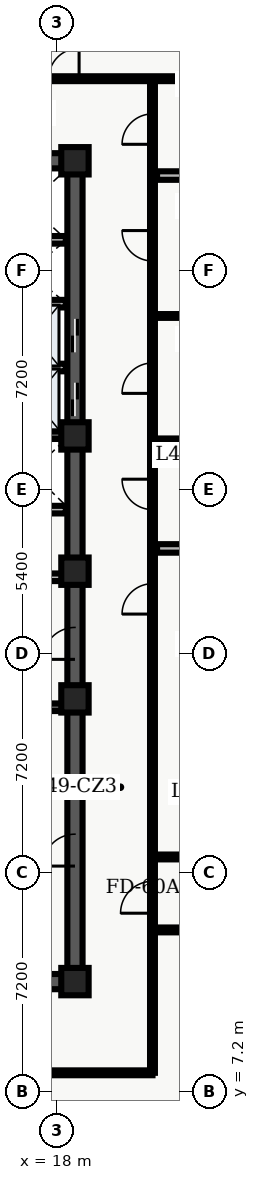
"""IFC4 building model, lengths in metres.
Left out: names, types, materials, properties, quantities, classifications, styles, units other than length and angle.
Written with IfcOpenShell. Run it as: python <this file> out.ifc"""

import sys

from ifc_helpers import new_model, entity, si_unit, converted_unit, direction, frame, origin_with_axes, origin_2d_with_axis, place, context, subcontext, project, spatial, polyline, rectangle, outline, extrude, element, fill, save


model = new_model("IFC4")
c1 = context("Model", 3, precision=1e-05, world=origin_with_axes(), true_north=direction((0.0, 1.0)))
c2 = subcontext(c1, "Body", "Model", "MODEL_VIEW")
j1 = project(units=[si_unit("LENGTHUNIT", "METRE"), converted_unit("PLANEANGLEUNIT", "DEGREE", entity("IfcPlaneAngleMeasure", 0.017), si_unit("PLANEANGLEUNIT", "RADIAN"), dimensions=[0, 0, 0, 0, 0, 0, 0])], contexts=[c1])
p1 = place(None, origin_with_axes())
s1 = spatial("IfcSite", under=j1, at=p1, CompositionType="ELEMENT")
p2 = place(p1, origin_with_axes())
s2 = spatial("IfcBuilding", under=s1, at=p2, CompositionType="ELEMENT")
p3 = place(p2, frame((0.0, 0.0, 200.4), z_axis=(0.0, 0.0, 1.0), x_axis=(1.0, 0.0, 0.0)))
s3 = spatial("IfcBuildingStorey", under=s2, at=p3, CompositionType="ELEMENT", Elevation=200.4)
p4 = place(p3, frame((11.4, 10.8, 0.0), z_axis=(0.0, 0.0, 1.0), x_axis=(1.0, 0.0, 0.0)))
e1 = element("IfcWall", 1, at=p4, inside=s3, PredefinedType="SHEAR", context=c2, shape_type="SweptSolid", body=[
    extrude(outline(polyline([(0.0, -0.25), (7.2, -0.25), (7.2, 0.25), (0.0, 0.25), (0.0, -0.25)])), origin_with_axes(), (0.0, 0.0, 1.0), 3.66),
])
p5 = place(p4, frame((2.625, 0.0, 0.0), z_axis=(0.0, 0.0, 1.0), x_axis=(1.0, 0.0, 0.0)))
e2 = element("IfcOpeningElement", 2, at=p5, cuts=e1, PredefinedType="OPENING", context=c2, shape_type="SweptSolid", body=[
    extrude(rectangle(XDim=1.05, YDim=0.52, at=origin_2d_with_axis()), origin_with_axes(), (0.0, 0.0, 1.0), 2.15),
])
p6 = place(p3, frame((11.4, 37.8, 0.0), z_axis=(0.0, 0.0, 1.0), x_axis=(1.0, 0.0, 0.0)))
e3 = element("IfcWall", 3, at=p6, inside=s3, PredefinedType="SHEAR", context=c2, shape_type="SweptSolid", body=[
    extrude(outline(polyline([(0.0, -0.25), (7.2, -0.25), (7.2, 0.25), (0.0, 0.25), (0.0, -0.25)])), origin_with_axes(), (0.0, 0.0, 1.0), 3.66),
])
p7 = place(p6, frame((2.625, 0.0, 0.0), z_axis=(0.0, 0.0, 1.0), x_axis=(1.0, 0.0, 0.0)))
e4 = element("IfcOpeningElement", 4, at=p7, cuts=e3, PredefinedType="OPENING", context=c2, shape_type="SweptSolid", body=[
    extrude(rectangle(XDim=1.05, YDim=0.52, at=origin_2d_with_axis()), origin_with_axes(), (0.0, 0.0, 1.0), 2.15),
])
p8 = place(p3, frame((18.6, 10.8, 0.0), z_axis=(0.0, 0.0, 1.0), x_axis=(0.0, 1.0, 0.0)))
e5 = element("IfcWall", 5, at=p8, inside=s3, PredefinedType="SHEAR", context=c2, shape_type="SweptSolid", body=[
    extrude(outline(polyline([(0.0, -0.25), (13.5, -0.25), (13.5, 0.25), (0.0, 0.25), (0.0, -0.25)])), origin_with_axes(), (0.0, 0.0, 1.0), 3.66),
])
p9 = place(p8, frame((11.125, 0.0, 0.0), z_axis=(0.0, 0.0, 1.0), x_axis=(1.0, 0.0, 0.0)))
e6 = element("IfcOpeningElement", 6, at=p9, cuts=e5, PredefinedType="OPENING", context=c2, shape_type="SweptSolid", body=[
    extrude(rectangle(XDim=1.05, YDim=0.52, at=origin_2d_with_axis()), origin_with_axes(), (0.0, 0.0, 1.0), 2.15),
])
p10 = place(p8, frame((4.325, 0.0, 0.0), z_axis=(0.0, 0.0, 1.0), x_axis=(1.0, 0.0, 0.0)))
e7 = element("IfcOpeningElement", 7, at=p10, cuts=e5, PredefinedType="OPENING", context=c2, shape_type="SweptSolid", body=[
    extrude(rectangle(XDim=1.05, YDim=0.52, at=origin_2d_with_axis()), origin_with_axes(), (0.0, 0.0, 1.0), 2.15),
])
p11 = place(p3, frame((18.6, 24.3, 0.0), z_axis=(0.0, 0.0, 1.0), x_axis=(0.0, 1.0, 0.0)))
e8 = element("IfcWall", 8, at=p11, inside=s3, PredefinedType="SHEAR", context=c2, shape_type="SweptSolid", body=[
    extrude(outline(polyline([(0.0, -0.25), (13.5, -0.25), (13.5, 0.25), (0.0, 0.25), (0.0, -0.25)])), origin_with_axes(), (0.0, 0.0, 1.0), 3.66),
])
p12 = place(p11, frame((5.65, 0.0, 0.0), z_axis=(0.0, 0.0, 1.0), x_axis=(1.0, 0.0, 0.0)))
e9 = element("IfcOpeningElement", 9, at=p12, cuts=e8, PredefinedType="OPENING", context=c2, shape_type="SweptSolid", body=[
    extrude(rectangle(XDim=1.1, YDim=0.52, at=origin_2d_with_axis()), origin_with_axes(), (0.0, 0.0, 1.0), 2.15),
])
p13 = place(p11, frame((7.75, 0.0, 0.0), z_axis=(0.0, 0.0, 1.0), x_axis=(1.0, 0.0, 0.0)))
e10 = element("IfcOpeningElement", 10, at=p13, cuts=e8, PredefinedType="OPENING", context=c2, shape_type="SweptSolid", body=[
    extrude(rectangle(XDim=1.1, YDim=0.52, at=origin_2d_with_axis()), origin_with_axes(), (0.0, 0.0, 1.0), 2.15),
])
for number, where, z_axis, x_axis in (
    (11, (11.65, 19.825, 0.0), (0.0, 0.0, 1.0), (1.0, 0.0, 0.0)),
    (12, (11.65, 28.775, 0.0), (0.0, 0.0, 1.0), (1.0, 0.0, 0.0)),
):
    element("IfcWall", number, at=place(p3, frame(where, z_axis=z_axis, x_axis=x_axis)), inside=s3, PredefinedType="SHEAR", context=c2, shape_type="SweptSolid", body=[
        extrude(outline(polyline([(0.0, -0.125), (6.7, -0.125), (6.7, 0.125), (0.0, 0.125), (0.0, -0.125)])), origin_with_axes(), (0.0, 0.0, 1.0), 3.66),
    ])
p14 = place(p3, frame((11.7, 24.1, 0.0), z_axis=(0.0, 0.0, 1.0), x_axis=(1.0, 0.0, 0.0)))
e13 = element("IfcWall", 13, at=p14, inside=s3, PredefinedType="SOLIDWALL", context=c2, shape_type="SweptSolid", body=[
    extrude(outline(polyline([(0.0, -0.125), (6.6, -0.125), (6.6, 0.125), (0.0, 0.125), (0.0, -0.125)])), origin_with_axes(), (0.0, 0.0, 1.0), 2.7),
])
p15 = place(p14, frame((3.75, 0.0, 0.0), z_axis=(0.0, 0.0, 1.0), x_axis=(1.0, 0.0, 0.0)))
e14 = element("IfcOpeningElement", 14, at=p15, cuts=e13, PredefinedType="OPENING", context=c2, shape_type="SweptSolid", body=[
    extrude(rectangle(XDim=0.9, YDim=0.27, at=origin_2d_with_axis()), origin_with_axes(), (0.0, 0.0, 1.0), 2.15),
])
p16 = place(p3, frame((11.7, 26.325, 0.0), z_axis=(0.0, 0.0, 1.0), x_axis=(1.0, 0.0, 0.0)))
e15 = element("IfcWall", 15, at=p16, inside=s3, PredefinedType="SOLIDWALL", context=c2, shape_type="SweptSolid", body=[
    extrude(outline(polyline([(0.0, -0.125), (6.6, -0.125), (6.6, 0.125), (0.0, 0.125), (0.0, -0.125)])), origin_with_axes(), (0.0, 0.0, 1.0), 2.7),
])
p17 = place(p16, frame((3.5, 0.0, 0.0), z_axis=(0.0, 0.0, 1.0), x_axis=(1.0, 0.0, 0.0)))
e16 = element("IfcOpeningElement", 16, at=p17, cuts=e15, PredefinedType="OPENING", context=c2, shape_type="SweptSolid", body=[
    extrude(rectangle(XDim=0.9, YDim=0.27, at=origin_2d_with_axis()), origin_with_axes(), (0.0, 0.0, 1.0), 2.15),
])
for number, where, z_axis, x_axis in (
    (17, (18.6, 10.8, 0.0), (0.0, 0.0, 1.0), (1.0, 0.0, 0.0)),
    (18, (18.6, 20.1, 0.0), (0.0, 0.0, 1.0), (1.0, 0.0, 0.0)),
    (19, (18.6, 24.3, 0.0), (0.0, 0.0, 1.0), (1.0, 0.0, 0.0)),
    (20, (18.6, 28.75, 0.0), (0.0, 0.0, 1.0), (1.0, 0.0, 0.0)),
    (21, (18.6, 37.8, 0.0), (0.0, 0.0, 1.0), (1.0, 0.0, 0.0)),
):
    element("IfcColumn", number, at=place(p3, frame(where, z_axis=z_axis, x_axis=x_axis)), inside=s3, PredefinedType="COLUMN", context=c2, shape_type="SweptSolid", body=[
        extrude(rectangle(XDim=0.9, YDim=0.9, at=origin_2d_with_axis()), origin_with_axes(), (0.0, 0.0, 1.0), 3.9),
    ])
for number, where, z_axis, x_axis in (
    (22, (15.84, 31.0, 0.0), (0.0, 0.0, 1.0), (1.0, 0.0, 0.0)),
    (23, (15.84, 33.1, 0.0), (0.0, 0.0, 1.0), (1.0, 0.0, 0.0)),
    (24, (15.84, 35.2, 0.0), (0.0, 0.0, 1.0), (1.0, 0.0, 0.0)),
):
    element("IfcWall", number, at=place(p3, frame(where, z_axis=z_axis, x_axis=x_axis)), inside=s3, PredefinedType="SOLIDWALL", context=c2, shape_type="SweptSolid", body=[
        extrude(outline(polyline([(0.0, -0.125), (2.46, -0.125), (2.46, 0.125), (0.0, 0.125), (0.0, -0.125)])), origin_with_axes(), (0.0, 0.0, 1.0), 2.7),
    ])
p18 = place(p3, frame((2.6, 7.8, 0.0), z_axis=(0.0, 0.0, 1.0), x_axis=(1.0, 0.0, 0.0)))
e25 = element("IfcWall", 25, at=p18, inside=s3, PredefinedType="PARTITIONING", context=c2, shape_type="SweptSolid", body=[
    extrude(outline(polyline([(0.0, -0.08), (18.55, -0.08), (18.55, 0.08), (0.0, 0.08), (0.0, -0.08)])), origin_with_axes(), (0.0, 0.0, 1.0), 2.7),
])
p19 = place(p18, frame((5.04, 0.0, 0.0), z_axis=(0.0, 0.0, 1.0), x_axis=(1.0, 0.0, 0.0)))
e26 = element("IfcOpeningElement", 26, at=p19, cuts=e25, PredefinedType="OPENING", context=c2, shape_type="SweptSolid", body=[
    extrude(rectangle(XDim=1.2, YDim=0.18, at=origin_2d_with_axis()), origin_with_axes(), (0.0, 0.0, 1.0), 2.2),
])
p20 = place(p18, frame((13.415, 0.0, 0.0), z_axis=(0.0, 0.0, 1.0), x_axis=(1.0, 0.0, 0.0)))
e27 = element("IfcOpeningElement", 27, at=p20, cuts=e25, PredefinedType="OPENING", context=c2, shape_type="SweptSolid", body=[
    extrude(rectangle(XDim=1.0, YDim=0.18, at=origin_2d_with_axis()), origin_with_axes(), (0.0, 0.0, 1.0), 2.15),
])
p21 = place(p3, frame((2.6, 40.5, 0.0), z_axis=(0.0, 0.0, 1.0), x_axis=(1.0, 0.0, 0.0)))
e28 = element("IfcWall", 28, at=p21, inside=s3, PredefinedType="PARTITIONING", context=c2, shape_type="SweptSolid", body=[
    extrude(outline(polyline([(0.0, -0.08), (26.177, -0.08), (26.177, 0.08), (0.0, 0.08), (0.0, -0.08)])), origin_with_axes(), (0.0, 0.0, 1.0), 2.7),
])
p22 = place(p21, frame((1.554, 0.0, 0.0), z_axis=(0.0, 0.0, 1.0), x_axis=(1.0, 0.0, 0.0)))
e29 = element("IfcOpeningElement", 29, at=p22, cuts=e28, PredefinedType="OPENING", context=c2, shape_type="SweptSolid", body=[
    extrude(rectangle(XDim=1.0, YDim=0.18, at=origin_2d_with_axis()), origin_with_axes(), (0.0, 0.0, 1.0), 2.15),
])
p23 = place(p21, frame((6.84, 0.0, 0.0), z_axis=(0.0, 0.0, 1.0), x_axis=(1.0, 0.0, 0.0)))
e30 = element("IfcOpeningElement", 30, at=p23, cuts=e28, PredefinedType="OPENING", context=c2, shape_type="SweptSolid", body=[
    extrude(rectangle(XDim=1.0, YDim=0.18, at=origin_2d_with_axis()), origin_with_axes(), (0.0, 0.0, 1.0), 2.15),
])
p24 = place(p21, frame((10.996, 0.0, 0.0), z_axis=(0.0, 0.0, 1.0), x_axis=(1.0, 0.0, 0.0)))
e31 = element("IfcOpeningElement", 31, at=p24, cuts=e28, PredefinedType="OPENING", context=c2, shape_type="SweptSolid", body=[
    extrude(rectangle(XDim=1.0, YDim=0.18, at=origin_2d_with_axis()), origin_with_axes(), (0.0, 0.0, 1.0), 2.15),
])
p25 = place(p21, frame((15.636, 0.0, 0.0), z_axis=(0.0, 0.0, 1.0), x_axis=(1.0, 0.0, 0.0)))
e32 = element("IfcOpeningElement", 32, at=p25, cuts=e28, PredefinedType="OPENING", context=c2, shape_type="SweptSolid", body=[
    extrude(rectangle(XDim=1.0, YDim=0.18, at=origin_2d_with_axis()), origin_with_axes(), (0.0, 0.0, 1.0), 2.15),
])
p26 = place(p3, frame((21.15, 7.8, 0.0), z_axis=(0.0, 0.0, 1.0), x_axis=(0.0, 1.0, 0.0)))
e33 = element("IfcWall", 33, at=p26, inside=s3, PredefinedType="PARTITIONING", context=c2, shape_type="SweptSolid", body=[
    extrude(outline(polyline([(0.0, -0.08), (32.7, -0.08), (32.7, 0.08), (0.0, 0.08), (0.0, -0.08)])), origin_with_axes(), (0.0, 0.0, 1.0), 2.7),
])
p27 = place(p26, frame((15.589, 0.0, 0.0), z_axis=(0.0, 0.0, 1.0), x_axis=(1.0, 0.0, 0.0)))
e34 = element("IfcOpeningElement", 34, at=p27, cuts=e33, PredefinedType="OPENING", context=c2, shape_type="SweptSolid", body=[
    extrude(rectangle(XDim=1.0, YDim=0.18, at=origin_2d_with_axis()), origin_with_axes(), (0.0, 0.0, 1.0), 2.15),
])
p28 = place(p26, frame((19.026, 0.0, 0.0), z_axis=(0.0, 0.0, 1.0), x_axis=(1.0, 0.0, 0.0)))
e35 = element("IfcOpeningElement", 35, at=p28, cuts=e33, PredefinedType="OPENING", context=c2, shape_type="SweptSolid", body=[
    extrude(rectangle(XDim=1.0, YDim=0.18, at=origin_2d_with_axis()), origin_with_axes(), (0.0, 0.0, 1.0), 2.15),
])
p29 = place(p26, frame((22.849, 0.0, 0.0), z_axis=(0.0, 0.0, 1.0), x_axis=(1.0, 0.0, 0.0)))
e36 = element("IfcOpeningElement", 36, at=p29, cuts=e33, PredefinedType="OPENING", context=c2, shape_type="SweptSolid", body=[
    extrude(rectangle(XDim=1.0, YDim=0.18, at=origin_2d_with_axis()), origin_with_axes(), (0.0, 0.0, 1.0), 2.15),
])
p30 = place(p26, frame((27.204, 0.0, 0.0), z_axis=(0.0, 0.0, 1.0), x_axis=(1.0, 0.0, 0.0)))
e37 = element("IfcOpeningElement", 37, at=p30, cuts=e33, PredefinedType="OPENING", context=c2, shape_type="SweptSolid", body=[
    extrude(rectangle(XDim=1.0, YDim=0.18, at=origin_2d_with_axis()), origin_with_axes(), (0.0, 0.0, 1.0), 2.15),
])
p31 = place(p26, frame((31.042, 0.0, 0.0), z_axis=(0.0, 0.0, 1.0), x_axis=(1.0, 0.0, 0.0)))
e38 = element("IfcOpeningElement", 38, at=p31, cuts=e33, PredefinedType="OPENING", context=c2, shape_type="SweptSolid", body=[
    extrude(rectangle(XDim=1.0, YDim=0.18, at=origin_2d_with_axis()), origin_with_axes(), (0.0, 0.0, 1.0), 2.15),
])
p32 = place(p26, frame((5.775, 0.0, 0.0), z_axis=(0.0, 0.0, 1.0), x_axis=(1.0, 0.0, 0.0)))
e39 = element("IfcOpeningElement", 39, at=p32, cuts=e33, PredefinedType="OPENING", context=c2, shape_type="SweptSolid", body=[
    extrude(rectangle(XDim=1.05, YDim=0.18, at=origin_2d_with_axis()), origin_with_axes(), (0.0, 0.0, 1.0), 2.15),
])
p33 = place(p3, frame((21.3, 25.049, 0.0), z_axis=(0.0, 0.0, 1.0), x_axis=(1.0, 0.0, 0.0)))
e40 = element("IfcWall", 40, at=p33, inside=s3, PredefinedType="PARTITIONING", context=c2, shape_type="SweptSolid", body=[
    extrude(outline(polyline([(0.0, -0.14), (7.477, -0.14), (7.477, 0.14), (0.0, 0.14), (0.0, -0.14)])), origin_with_axes(), (0.0, 0.0, 1.0), 2.7),
])
for number, where, z_axis, x_axis in (
    (41, (21.3, 28.603, 0.0), (0.0, 0.0, 1.0), (1.0, 0.0, 0.0)),
    (42, (21.3, 32.695, 0.0), (0.0, 0.0, 1.0), (1.0, 0.0, 0.0)),
):
    element("IfcWall", number, at=place(p3, frame(where, z_axis=z_axis, x_axis=x_axis)), inside=s3, PredefinedType="PARTITIONING", context=c2, shape_type="SweptSolid", body=[
        extrude(outline(polyline([(0.0, -0.062), (7.477, -0.062), (7.477, 0.062), (0.0, 0.062), (0.0, -0.062)])), origin_with_axes(), (0.0, 0.0, 1.0), 2.7),
    ])
p34 = place(p3, frame((21.3, 37.314, 0.0), z_axis=(0.0, 0.0, 1.0), x_axis=(1.0, 0.0, 0.0)))
e43 = element("IfcWall", 43, at=p34, inside=s3, PredefinedType="PARTITIONING", context=c2, shape_type="SweptSolid", body=[
    extrude(outline(polyline([(0.0, -0.14), (7.477, -0.14), (7.477, 0.14), (0.0, 0.14), (0.0, -0.14)])), origin_with_axes(), (0.0, 0.0, 1.0), 2.7),
])
p35 = place(p3, frame((21.15, 12.5, 0.0), z_axis=(0.0, 0.0, 1.0), x_axis=(1.0, 0.0, 0.0)))
e44 = element("IfcWall", 44, at=p35, inside=s3, PredefinedType="PARTITIONING", context=c2, shape_type="SweptSolid", body=[
    extrude(outline(polyline([(0.0, -0.08), (15.2, -0.08), (15.2, 0.08), (0.0, 0.08), (0.0, -0.08)])), origin_with_axes(), (0.0, 0.0, 1.0), 2.7),
])
p36 = place(p35, frame((1.758, 0.0, 0.0), z_axis=(0.0, 0.0, 1.0), x_axis=(1.0, 0.0, 0.0)))
e45 = element("IfcOpeningElement", 45, at=p36, cuts=e44, PredefinedType="OPENING", context=c2, shape_type="SweptSolid", body=[
    extrude(rectangle(XDim=1.0, YDim=0.18, at=origin_2d_with_axis()), origin_with_axes(), (0.0, 0.0, 1.0), 2.15),
])
p37 = place(p35, frame((4.893, 0.0, 0.0), z_axis=(0.0, 0.0, 1.0), x_axis=(1.0, 0.0, 0.0)))
e46 = element("IfcOpeningElement", 46, at=p37, cuts=e44, PredefinedType="OPENING", context=c2, shape_type="SweptSolid", body=[
    extrude(rectangle(XDim=1.0, YDim=0.18, at=origin_2d_with_axis()), origin_with_axes(), (0.0, 0.0, 1.0), 2.15),
])
p38 = place(p35, frame((8.555, 0.0, 0.0), z_axis=(0.0, 0.0, 1.0), x_axis=(1.0, 0.0, 0.0)))
e47 = element("IfcOpeningElement", 47, at=p38, cuts=e44, PredefinedType="OPENING", context=c2, shape_type="SweptSolid", body=[
    extrude(rectangle(XDim=1.0, YDim=0.18, at=origin_2d_with_axis()), origin_with_axes(), (0.0, 0.0, 1.0), 2.15),
])
p39 = place(p35, frame((12.889, 0.0, 0.0), z_axis=(0.0, 0.0, 1.0), x_axis=(1.0, 0.0, 0.0)))
e48 = element("IfcOpeningElement", 48, at=p39, cuts=e44, PredefinedType="OPENING", context=c2, shape_type="SweptSolid", body=[
    extrude(rectangle(XDim=1.0, YDim=0.18, at=origin_2d_with_axis()), origin_with_axes(), (0.0, 0.0, 1.0), 2.15),
])
p40 = place(p3, frame((21.15, 14.9, 0.0), z_axis=(0.0, 0.0, 1.0), x_axis=(1.0, 0.0, 0.0)))
e49 = element("IfcWall", 49, at=p40, inside=s3, PredefinedType="PARTITIONING", context=c2, shape_type="SweptSolid", body=[
    extrude(outline(polyline([(0.0, -0.08), (15.2, -0.08), (15.2, 0.08), (0.0, 0.08), (0.0, -0.08)])), origin_with_axes(), (0.0, 0.0, 1.0), 2.7),
])
p41 = place(p40, frame((7.65, 0.0, 0.0), z_axis=(0.0, 0.0, 1.0), x_axis=(1.0, 0.0, 0.0)))
e50 = element("IfcOpeningElement", 50, at=p41, cuts=e49, PredefinedType="OPENING", context=c2, shape_type="SweptSolid", body=[
    extrude(rectangle(XDim=1.0, YDim=0.18, at=origin_2d_with_axis()), origin_with_axes(), (0.0, 0.0, 1.0), 2.15),
])
p42 = place(p11, frame((5.65, 0.0, 0.0), z_axis=(0.0, 0.0, 1.0), x_axis=(1.0, 0.0, 0.0)))
e51 = element("IfcDoor", 51, at=p42, inside=s3, OperationType="SLIDING_TO_LEFT", PredefinedType="DOOR", context=c2, shape_type="SweptSolid", body=[
    extrude(rectangle(XDim=1.1, YDim=0.09, at=origin_2d_with_axis()), origin_with_axes(), (0.0, 0.0, 1.0), 2.15),
])
fill(e9, e51)
p43 = place(p11, frame((7.75, 0.0, 0.0), z_axis=(0.0, 0.0, 1.0), x_axis=(1.0, 0.0, 0.0)))
e52 = element("IfcDoor", 52, at=p43, inside=s3, OperationType="SLIDING_TO_RIGHT", PredefinedType="DOOR", context=c2, shape_type="SweptSolid", body=[
    extrude(rectangle(XDim=1.1, YDim=0.09, at=origin_2d_with_axis()), origin_with_axes(), (0.0, 0.0, 1.0), 2.15),
])
fill(e10, e52)
p44 = place(p8, frame((11.125, 0.0, 0.0), z_axis=(0.0, 0.0, 1.0), x_axis=(1.0, 0.0, 0.0)))
e53 = element("IfcDoor", 53, at=p44, inside=s3, OperationType="SINGLE_SWING_LEFT", PredefinedType="DOOR", context=c2, shape_type="SweptSolid", body=[
    extrude(rectangle(XDim=1.05, YDim=0.09, at=origin_2d_with_axis()), origin_with_axes(), (0.0, 0.0, 1.0), 2.15),
])
fill(e6, e53)
p45 = place(p8, frame((4.325, 0.0, 0.0), z_axis=(0.0, 0.0, 1.0), x_axis=(1.0, 0.0, 0.0)))
e54 = element("IfcDoor", 54, at=p45, inside=s3, OperationType="SINGLE_SWING_LEFT", PredefinedType="DOOR", context=c2, shape_type="SweptSolid", body=[
    extrude(rectangle(XDim=1.05, YDim=0.09, at=origin_2d_with_axis()), origin_with_axes(), (0.0, 0.0, 1.0), 2.15),
])
fill(e7, e54)
p46 = place(p21, frame((15.636, 0.0, 0.0), z_axis=(0.0, 0.0, 1.0), x_axis=(1.0, 0.0, 0.0)))
e55 = element("IfcDoor", 55, at=p46, inside=s3, OperationType="SINGLE_SWING_RIGHT", PredefinedType="DOOR", context=c2, shape_type="SweptSolid", body=[
    extrude(rectangle(XDim=1.0, YDim=0.09, at=origin_2d_with_axis()), origin_with_axes(), (0.0, 0.0, 1.0), 2.15),
])
fill(e32, e55)
p47 = place(p26, frame((15.589, 0.0, 0.0), z_axis=(0.0, 0.0, 1.0), x_axis=(1.0, 0.0, 0.0)))
e56 = element("IfcDoor", 56, at=p47, inside=s3, OperationType="SINGLE_SWING_LEFT", PredefinedType="DOOR", context=c2, shape_type="SweptSolid", body=[
    extrude(rectangle(XDim=1.0, YDim=0.09, at=origin_2d_with_axis()), origin_with_axes(), (0.0, 0.0, 1.0), 2.15),
])
fill(e34, e56)
p48 = place(p26, frame((19.026, 0.0, 0.0), z_axis=(0.0, 0.0, 1.0), x_axis=(1.0, 0.0, 0.0)))
e57 = element("IfcDoor", 57, at=p48, inside=s3, OperationType="SINGLE_SWING_RIGHT", PredefinedType="DOOR", context=c2, shape_type="SweptSolid", body=[
    extrude(rectangle(XDim=1.0, YDim=0.09, at=origin_2d_with_axis()), origin_with_axes(), (0.0, 0.0, 1.0), 2.15),
])
fill(e35, e57)
p49 = place(p26, frame((22.849, 0.0, 0.0), z_axis=(0.0, 0.0, 1.0), x_axis=(1.0, 0.0, 0.0)))
e58 = element("IfcDoor", 58, at=p49, inside=s3, OperationType="SINGLE_SWING_LEFT", PredefinedType="DOOR", context=c2, shape_type="SweptSolid", body=[
    extrude(rectangle(XDim=1.0, YDim=0.09, at=origin_2d_with_axis()), origin_with_axes(), (0.0, 0.0, 1.0), 2.15),
])
fill(e36, e58)
p50 = place(p26, frame((27.204, 0.0, 0.0), z_axis=(0.0, 0.0, 1.0), x_axis=(1.0, 0.0, 0.0)))
e59 = element("IfcDoor", 59, at=p50, inside=s3, OperationType="SINGLE_SWING_RIGHT", PredefinedType="DOOR", context=c2, shape_type="SweptSolid", body=[
    extrude(rectangle(XDim=1.0, YDim=0.09, at=origin_2d_with_axis()), origin_with_axes(), (0.0, 0.0, 1.0), 2.15),
])
fill(e37, e59)
p51 = place(p26, frame((31.042, 0.0, 0.0), z_axis=(0.0, 0.0, 1.0), x_axis=(1.0, 0.0, 0.0)))
e60 = element("IfcDoor", 60, at=p51, inside=s3, OperationType="SINGLE_SWING_LEFT", PredefinedType="DOOR", context=c2, shape_type="SweptSolid", body=[
    extrude(rectangle(XDim=1.0, YDim=0.09, at=origin_2d_with_axis()), origin_with_axes(), (0.0, 0.0, 1.0), 2.15),
])
fill(e38, e60)
p52 = place(p26, frame((5.775, 0.0, 0.0), z_axis=(0.0, 0.0, 1.0), x_axis=(1.0, 0.0, 0.0)))
e61 = element("IfcDoor", 61, at=p52, inside=s3, OperationType="SINGLE_SWING_LEFT", PredefinedType="DOOR", context=c2, shape_type="SweptSolid", body=[
    extrude(rectangle(XDim=1.05, YDim=0.09, at=origin_2d_with_axis()), origin_with_axes(), (0.0, 0.0, 1.0), 2.15),
])
fill(e39, e61)
save(model, sys.argv[1])
